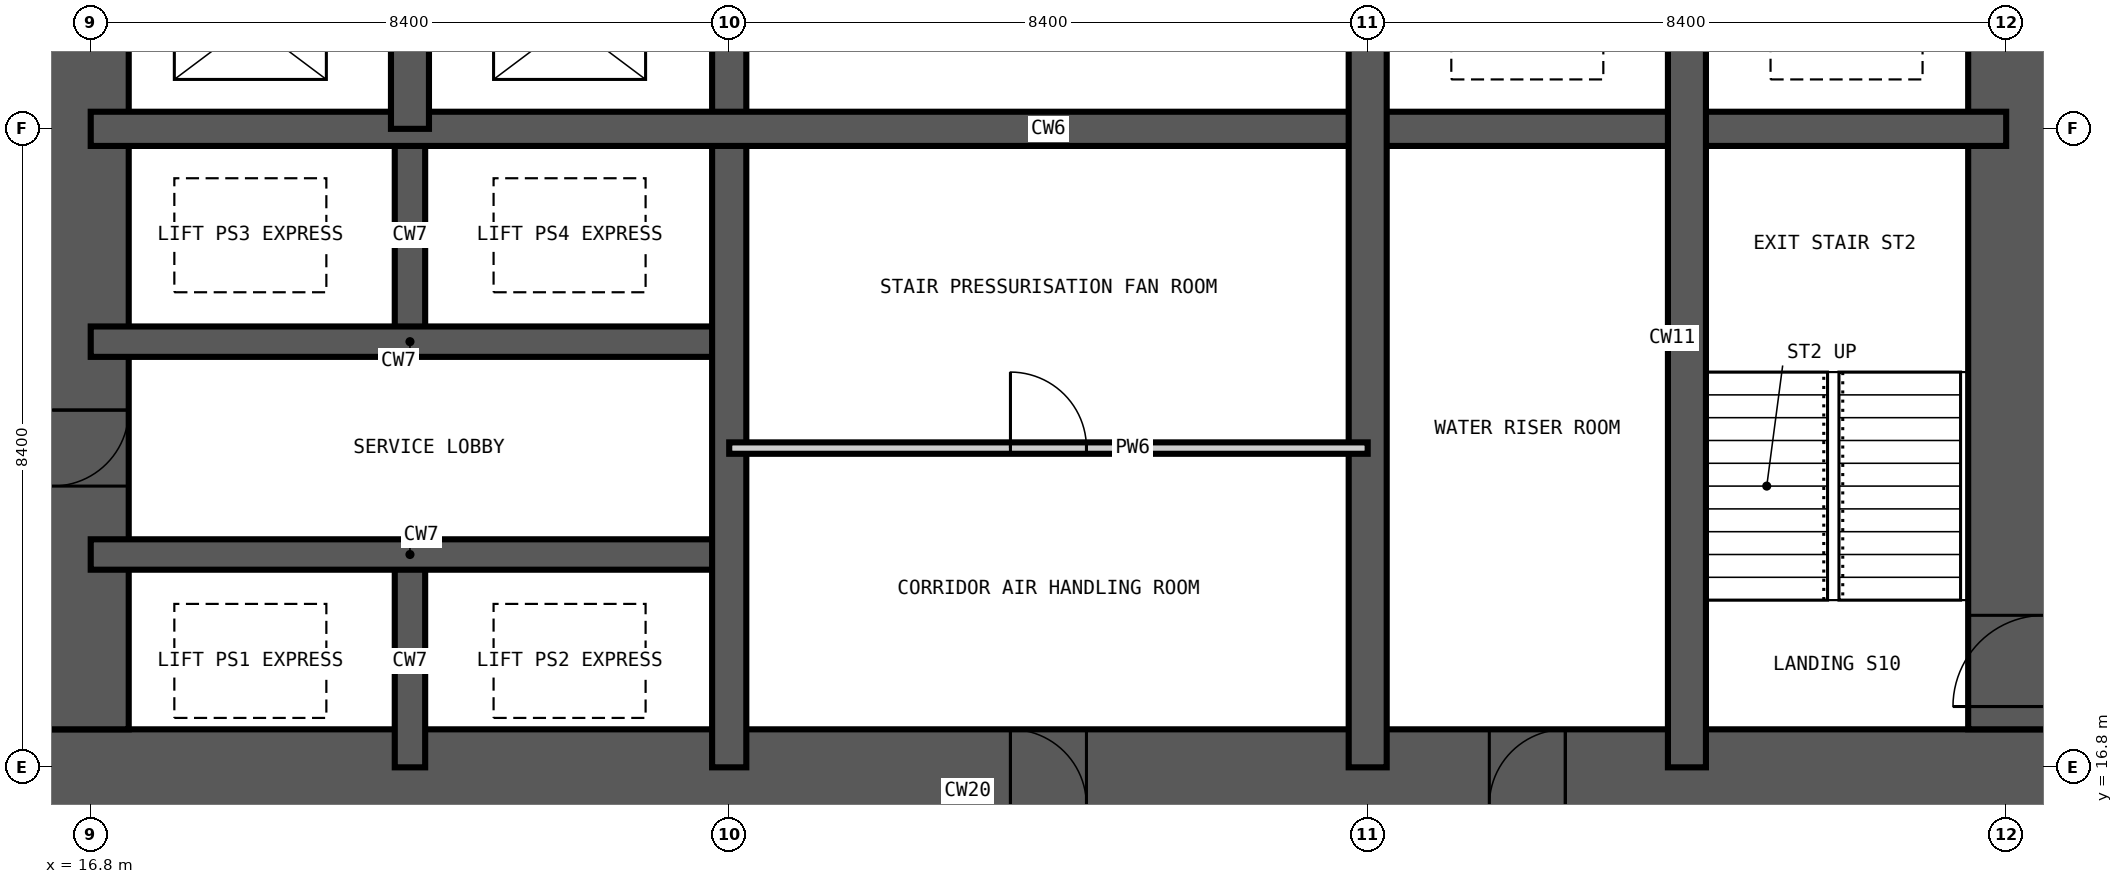
"""IFC4 building model, lengths in metres.
Left out: names, types, materials, properties, quantities, classifications, styles, units other than length and angle.
Written with IfcOpenShell. Run it as: python <this file> out.ifc"""

import sys

from ifc_helpers import new_model, si_unit, direction, frame, frame_2d, origin, place, context, subcontext, project, spatial, rectangle, extrude, element, fill, save


model = new_model("IFC4")
c1 = context("Model", 3, precision=1e-05, world=origin(), true_north=direction((0.0, 1.0)))
c2 = subcontext(c1, "Body", "Model", "MODEL_VIEW")
j1 = project(units=[si_unit("LENGTHUNIT", "METRE"), si_unit("PLANEANGLEUNIT", "RADIAN")], contexts=[c1])
p1 = place(None, origin())
s1 = spatial("IfcSite", under=j1, at=p1, CompositionType="ELEMENT")
p2 = place(p1, origin())
s2 = spatial("IfcBuilding", under=s1, at=p2, CompositionType="ELEMENT")
p3 = place(p2, frame((0.0, 0.0, 27.0)))
s3 = spatial("IfcBuildingStorey", under=s2, at=p3, CompositionType="ELEMENT", Elevation=27.0)
p4 = place(p3, frame((15.3, 16.3, -0.35), z_axis=(0.0, 0.0, 1.0), x_axis=(1.0, 0.0, 0.0)))
e1 = element("IfcWall", 1, at=p4, inside=s3, PredefinedType="SHEAR", context=c2, shape_type="SweptSolid", body=[
    extrude(rectangle(XDim=28.2, YDim=2.0, at=frame_2d((14.1, 0.0))), origin(), (0.0, 0.0, 1.0), 3.6),
])
p5 = place(p4, frame((13.6, 0.0, 0.35)))
e2 = element("IfcOpeningElement", 2, at=p5, cuts=e1, PredefinedType="OPENING", context=c2, shape_type="SweptSolid", body=[
    extrude(rectangle(XDim=1.0, YDim=2.1, at=frame_2d((0.5, 1.05))), frame((0.0, 1.01, 0.0), z_axis=(0.0, -1.0, 0.0), x_axis=(1.0, 0.0, 0.0)), (0.0, 0.0, 1.0), 2.02),
])
p6 = place(p4, frame((19.9, 0.0, 0.35)))
e3 = element("IfcOpeningElement", 3, at=p6, cuts=e1, PredefinedType="OPENING", context=c2, shape_type="SweptSolid", body=[
    extrude(rectangle(XDim=1.0, YDim=2.1, at=frame_2d((0.5, 1.05))), frame((0.0, 1.01, 0.0), z_axis=(0.0, -1.0, 0.0), x_axis=(1.0, 0.0, 0.0)), (0.0, 0.0, 1.0), 2.02),
])
p7 = place(p3, frame((42.5, 17.3, -0.35), z_axis=(0.0, 0.0, 1.0), x_axis=(0.0, 1.0, 0.0)))
e4 = element("IfcWall", 4, at=p7, inside=s3, PredefinedType="SHEAR", context=c2, shape_type="SweptSolid", body=[
    extrude(rectangle(XDim=24.2, YDim=2.0, at=frame_2d((12.1, 0.0))), origin(), (0.0, 0.0, 1.0), 3.6),
])
p8 = place(p7, frame((0.3, 0.0, 0.35)))
e5 = element("IfcOpeningElement", 5, at=p8, cuts=e4, PredefinedType="OPENING", context=c2, shape_type="SweptSolid", body=[
    extrude(rectangle(XDim=1.2, YDim=2.2, at=frame_2d((0.6, 1.1))), frame((0.0, 1.01, 0.0), z_axis=(0.0, -1.0, 0.0), x_axis=(1.0, 0.0, 0.0)), (0.0, 0.0, 1.0), 2.02),
])
p9 = place(p7, frame((11.6, 0.0, 0.35)))
e6 = element("IfcOpeningElement", 6, at=p9, cuts=e4, PredefinedType="OPENING", context=c2, shape_type="SweptSolid", body=[
    extrude(rectangle(XDim=1.0, YDim=2.1, at=frame_2d((0.5, 1.05))), frame((0.0, 1.01, 0.0), z_axis=(0.0, -1.0, 0.0), x_axis=(1.0, 0.0, 0.0)), (0.0, 0.0, 1.0), 2.02),
])
p10 = place(p7, frame((20.0, 0.0, 0.35)))
e7 = element("IfcOpeningElement", 7, at=p10, cuts=e4, PredefinedType="OPENING", context=c2, shape_type="SweptSolid", body=[
    extrude(rectangle(XDim=1.0, YDim=2.1, at=frame_2d((0.5, 1.05))), frame((0.0, 1.01, 0.0), z_axis=(0.0, -1.0, 0.0), x_axis=(1.0, 0.0, 0.0)), (0.0, 0.0, 1.0), 2.02),
])
p11 = place(p3, frame((16.3, 41.5, -0.35), z_axis=(0.0, 0.0, 1.0), x_axis=(0.0, -1.0, 0.0)))
e8 = element("IfcWall", 8, at=p11, inside=s3, PredefinedType="SHEAR", context=c2, shape_type="SweptSolid", body=[
    extrude(rectangle(XDim=24.2, YDim=2.0, at=frame_2d((12.1, 0.0))), origin(), (0.0, 0.0, 1.0), 3.6),
])
p12 = place(p11, frame((11.2, 0.0, 0.35)))
e9 = element("IfcOpeningElement", 9, at=p12, cuts=e8, PredefinedType="OPENING", context=c2, shape_type="SweptSolid", body=[
    extrude(rectangle(XDim=1.8, YDim=2.2, at=frame_2d((0.9, 1.1))), frame((0.0, 1.01, 0.0), z_axis=(0.0, -1.0, 0.0), x_axis=(1.0, 0.0, 0.0)), (0.0, 0.0, 1.0), 2.02),
])
p13 = place(p11, frame((20.0, 0.0, 0.35)))
e10 = element("IfcOpeningElement", 10, at=p13, cuts=e8, PredefinedType="OPENING", context=c2, shape_type="SweptSolid", body=[
    extrude(rectangle(XDim=1.0, YDim=2.1, at=frame_2d((0.5, 1.05))), frame((0.0, 1.01, 0.0), z_axis=(0.0, -1.0, 0.0), x_axis=(1.0, 0.0, 0.0)), (0.0, 0.0, 1.0), 2.02),
])
p14 = place(p11, frame((5.3, 0.0, 0.35)))
e11 = element("IfcOpeningElement", 11, at=p14, cuts=e8, PredefinedType="OPENING", context=c2, shape_type="SweptSolid", body=[
    extrude(rectangle(XDim=1.0, YDim=2.1, at=frame_2d((0.5, 1.05))), frame((0.0, 1.01, 0.0), z_axis=(0.0, -1.0, 0.0), x_axis=(1.0, 0.0, 0.0)), (0.0, 0.0, 1.0), 2.02),
])
for number, where, z_axis, x_axis in (
    (12, (21.0, 16.8, -0.35), (0.0, 0.0, 1.0), (0.0, 1.0, 0.0)),
    (13, (21.0, 22.4, -0.35), (0.0, 0.0, 1.0), (0.0, 1.0, 0.0)),
):
    element("IfcWall", number, at=place(p3, frame(where, z_axis=z_axis, x_axis=x_axis)), inside=s3, PredefinedType="SHEAR", context=c2, shape_type="SweptSolid", body=[
        extrude(rectangle(XDim=2.8, YDim=0.4, at=frame_2d((1.4, 0.0))), origin(), (0.0, 0.0, 1.0), 3.6),
    ])
for number, where, z_axis, x_axis in (
    (14, (16.8, 19.6, -0.35), (0.0, 0.0, 1.0), (1.0, 0.0, 0.0)),
    (15, (16.8, 22.4, -0.35), (0.0, 0.0, 1.0), (1.0, 0.0, 0.0)),
):
    element("IfcWall", number, at=place(p3, frame(where, z_axis=z_axis, x_axis=x_axis)), inside=s3, PredefinedType="SHEAR", context=c2, shape_type="SweptSolid", body=[
        extrude(rectangle(XDim=8.4, YDim=0.4, at=frame_2d((4.2, 0.0))), origin(), (0.0, 0.0, 1.0), 3.6),
    ])
for number, where, z_axis, x_axis in (
    (16, (25.2, 16.8, -0.35), (0.0, 0.0, 1.0), (0.0, 1.0, 0.0)),
    (17, (16.8, 25.2, -0.35), (0.0, 0.0, 1.0), (1.0, 0.0, 0.0)),
):
    element("IfcWall", number, at=place(p3, frame(where, z_axis=z_axis, x_axis=x_axis)), inside=s3, PredefinedType="SHEAR", context=c2, shape_type="SweptSolid", body=[
        extrude(rectangle(XDim=25.2, YDim=0.45, at=frame_2d((12.6, 0.0))), origin(), (0.0, 0.0, 1.0), 3.6),
    ])
p15 = place(p3, frame((21.0, 25.2, -0.35), z_axis=(0.0, 0.0, 1.0), x_axis=(0.0, 1.0, 0.0)))
e18 = element("IfcWall", 18, at=p15, inside=s3, PredefinedType="SHEAR", context=c2, shape_type="SweptSolid", body=[
    extrude(rectangle(XDim=2.8, YDim=0.5, at=frame_2d((1.4, 0.0))), origin(), (0.0, 0.0, 1.0), 3.6),
])
p16 = place(p3, frame((33.6, 16.8, -0.35), z_axis=(0.0, 0.0, 1.0), x_axis=(0.0, 1.0, 0.0)))
e19 = element("IfcWall", 19, at=p16, inside=s3, PredefinedType="SHEAR", context=c2, shape_type="SweptSolid", body=[
    extrude(rectangle(XDim=25.2, YDim=0.5, at=frame_2d((12.6, 0.0))), origin(), (0.0, 0.0, 1.0), 3.6),
])
p17 = place(p16, frame((22.5, 0.0, 0.35)))
e20 = element("IfcOpeningElement", 20, at=p17, cuts=e19, PredefinedType="OPENING", context=c2, shape_type="SweptSolid", body=[
    extrude(rectangle(XDim=1.2, YDim=2.2, at=frame_2d((0.6, 1.1))), frame((0.0, 0.26, 0.0), z_axis=(0.0, -1.0, 0.0), x_axis=(1.0, 0.0, 0.0)), (0.0, 0.0, 1.0), 0.52),
])
p18 = place(p16, frame((18.3, 0.0, 0.35)))
e21 = element("IfcOpeningElement", 21, at=p18, cuts=e19, PredefinedType="OPENING", context=c2, shape_type="SweptSolid", body=[
    extrude(rectangle(XDim=1.2, YDim=2.2, at=frame_2d((0.6, 1.1))), frame((0.0, 0.26, 0.0), z_axis=(0.0, -1.0, 0.0), x_axis=(1.0, 0.0, 0.0)), (0.0, 0.0, 1.0), 0.52),
])
p19 = place(p16, frame((12.1, 0.0, 0.35)))
e22 = element("IfcOpeningElement", 22, at=p19, cuts=e19, PredefinedType="OPENING", context=c2, shape_type="SweptSolid", body=[
    extrude(rectangle(XDim=1.0, YDim=2.1, at=frame_2d((0.5, 1.05))), frame((0.0, 0.26, 0.0), z_axis=(0.0, -1.0, 0.0), x_axis=(1.0, 0.0, 0.0)), (0.0, 0.0, 1.0), 0.52),
])
p20 = place(p3, frame((37.8, 16.8, -0.35), z_axis=(0.0, 0.0, 1.0), x_axis=(0.0, 1.0, 0.0)))
e23 = element("IfcWall", 23, at=p20, inside=s3, PredefinedType="SHEAR", context=c2, shape_type="SweptSolid", body=[
    extrude(rectangle(XDim=11.2, YDim=0.5, at=frame_2d((5.6, 0.0))), origin(), (0.0, 0.0, 1.0), 3.6),
])
p21 = place(p3, frame((25.2, 21.0, 0.0), z_axis=(0.0, 0.0, 1.0), x_axis=(1.0, 0.0, 0.0)))
e24 = element("IfcWall", 24, at=p21, inside=s3, PredefinedType="PARTITIONING", context=c2, shape_type="SweptSolid", body=[
    extrude(rectangle(XDim=8.4, YDim=0.15, at=frame_2d((4.2, 0.0))), origin(), (0.0, 0.0, 1.0), 3.25),
])
p22 = place(p21, frame((3.7, 0.0, 0.0)))
e25 = element("IfcOpeningElement", 25, at=p22, cuts=e24, PredefinedType="OPENING", context=c2, shape_type="SweptSolid", body=[
    extrude(rectangle(XDim=1.0, YDim=2.1, at=frame_2d((0.5, 1.05))), frame((0.0, 0.085, 0.0), z_axis=(0.0, -1.0, 0.0), x_axis=(1.0, 0.0, 0.0)), (0.0, 0.0, 1.0), 0.17),
])
p23 = place(p8, origin())
e26 = element("IfcDoor", 26, at=p23, inside=s3, OperationType="SINGLE_SWING_LEFT", PredefinedType="DOOR", context=c2, shape_type="SweptSolid", body=[
    extrude(rectangle(XDim=1.2, YDim=2.2, at=frame_2d((0.6, 1.1))), frame((0.0, 0.025, 0.0), z_axis=(0.0, -1.0, 0.0), x_axis=(1.0, 0.0, 0.0)), (0.0, 0.0, 1.0), 0.05),
])
fill(e5, e26)
p24 = place(p13, origin())
e27 = element("IfcDoor", 27, at=p24, inside=s3, OperationType="SINGLE_SWING_LEFT", PredefinedType="DOOR", context=c2, shape_type="SweptSolid", body=[
    extrude(rectangle(XDim=1.0, YDim=2.1, at=frame_2d((0.5, 1.05))), frame((0.0, 0.025, 0.0), z_axis=(0.0, -1.0, 0.0), x_axis=(1.0, 0.0, 0.0)), (0.0, 0.0, 1.0), 0.05),
])
fill(e10, e27)
p25 = place(p5, origin())
e28 = element("IfcDoor", 28, at=p25, inside=s3, OperationType="SINGLE_SWING_LEFT", PredefinedType="DOOR", context=c2, shape_type="SweptSolid", body=[
    extrude(rectangle(XDim=1.0, YDim=2.1, at=frame_2d((0.5, 1.05))), frame((0.0, 0.025, 0.0), z_axis=(0.0, -1.0, 0.0), x_axis=(1.0, 0.0, 0.0)), (0.0, 0.0, 1.0), 0.05),
])
fill(e2, e28)
p26 = place(p22, origin())
e29 = element("IfcDoor", 29, at=p26, inside=s3, OperationType="SINGLE_SWING_LEFT", PredefinedType="DOOR", context=c2, shape_type="SweptSolid", body=[
    extrude(rectangle(XDim=1.0, YDim=2.1, at=frame_2d((0.5, 1.05))), frame((0.0, 0.025, 0.0), z_axis=(0.0, -1.0, 0.0), x_axis=(1.0, 0.0, 0.0)), (0.0, 0.0, 1.0), 0.05),
])
fill(e25, e29)
p27 = place(p6, origin())
e30 = element("IfcDoor", 30, at=p27, inside=s3, OperationType="SINGLE_SWING_RIGHT", PredefinedType="DOOR", context=c2, shape_type="SweptSolid", body=[
    extrude(rectangle(XDim=1.0, YDim=2.1, at=frame_2d((0.5, 1.05))), frame((0.0, 0.025, 0.0), z_axis=(0.0, -1.0, 0.0), x_axis=(1.0, 0.0, 0.0)), (0.0, 0.0, 1.0), 0.05),
])
fill(e3, e30)
save(model, sys.argv[1])
